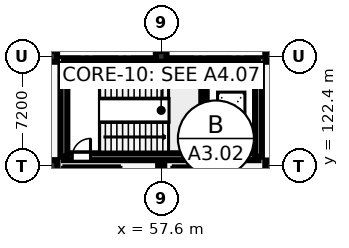
"""IFC4 building model, lengths in metres.
Left out: names, types, materials, properties, quantities, classifications, styles, units other than length and angle.
Written with IfcOpenShell. Run it as: python <this file> out.ifc"""

import sys

from ifc_helpers import new_model, si_unit, direction, frame, frame_2d, origin, origin_2d, place, context, subcontext, project, spatial, rectangle, hollow_rectangle, extrude, element, fill, save


model = new_model("IFC4")
c1 = context("Model", 3, precision=1e-05, world=origin(), true_north=direction((0.0, 1.0)))
c2 = subcontext(c1, "Body", "Model", "MODEL_VIEW")
j1 = project(units=[si_unit("LENGTHUNIT", "METRE"), si_unit("PLANEANGLEUNIT", "RADIAN")], contexts=[c1])
p1 = place(None, origin())
s1 = spatial("IfcSite", under=j1, at=p1, CompositionType="ELEMENT")
p2 = place(p1, origin())
s2 = spatial("IfcBuilding", under=s1, at=p2, CompositionType="ELEMENT")
p3 = place(p2, frame((0.0, 0.0, 9.6)))
s3 = spatial("IfcBuildingStorey", under=s2, at=p3, CompositionType="ELEMENT", Elevation=9.6)
p4 = place(p3, frame((50.4, 122.4, 0.0), z_axis=(0.0, 0.0, 1.0), x_axis=(1.0, 0.0, 0.0)))
e1 = element("IfcColumn", 1, at=p4, inside=s3, PredefinedType="COLUMN", context=c2, shape_type="SweptSolid", body=[
    extrude(rectangle(XDim=0.75, YDim=0.75, at=origin_2d()), origin(), (0.0, 0.0, 1.0), 4.2),
])
p5 = place(p3, frame((50.4, 129.6, 0.0), z_axis=(0.0, 0.0, 1.0), x_axis=(1.0, 0.0, 0.0)))
e2 = element("IfcColumn", 2, at=p5, inside=s3, PredefinedType="COLUMN", context=c2, shape_type="SweptSolid", body=[
    extrude(rectangle(XDim=0.7, YDim=0.7, at=origin_2d()), origin(), (0.0, 0.0, 1.0), 4.2),
])
p6 = place(p3, frame((57.6, 122.4, 0.0), z_axis=(0.0, 0.0, 1.0), x_axis=(1.0, 0.0, 0.0)))
e3 = element("IfcColumn", 3, at=p6, inside=s3, PredefinedType="COLUMN", context=c2, shape_type="SweptSolid", body=[
    extrude(hollow_rectangle(XDim=0.4, YDim=0.4, WallThickness=0.02, at=origin_2d()), origin(), (0.0, 0.0, 1.0), 4.2),
])
for number, where, z_axis, x_axis in (
    (4, (57.6, 129.6, 0.0), (0.0, 0.0, 1.0), (1.0, 0.0, 0.0)),
    (5, (64.8, 122.4, 0.0), (0.0, 0.0, 1.0), (1.0, 0.0, 0.0)),
    (6, (64.8, 129.6, 0.0), (0.0, 0.0, 1.0), (1.0, 0.0, 0.0)),
):
    element("IfcColumn", number, at=place(p3, frame(where, z_axis=z_axis, x_axis=x_axis)), inside=s3, PredefinedType="COLUMN", context=c2, shape_type="SweptSolid", body=[
        extrude(rectangle(XDim=0.7, YDim=0.7, at=origin_2d()), origin(), (0.0, 0.0, 1.0), 4.2),
    ])
p7 = place(p3, frame((51.2, 123.0, 0.0), z_axis=(0.0, 0.0, 1.0), x_axis=(1.0, 0.0, 0.0)))
e7 = element("IfcWall", 7, at=p7, inside=s3, PredefinedType="SHEAR", context=c2, shape_type="SweptSolid", body=[
    extrude(rectangle(XDim=12.8, YDim=0.45, at=frame_2d((6.4, 0.0))), origin(), (0.0, 0.0, 1.0), 3.88),
])
p8 = place(p7, frame((0.55, 0.0, 0.0)))
e8 = element("IfcOpeningElement", 8, at=p8, cuts=e7, PredefinedType="OPENING", context=c2, shape_type="SweptSolid", body=[
    extrude(rectangle(XDim=1.2, YDim=2.25, at=frame_2d((0.6, 1.125))), frame((0.0, 0.235, 0.0), z_axis=(0.0, -1.0, 0.0), x_axis=(1.0, 0.0, 0.0)), (0.0, 0.0, 1.0), 0.47),
])
p9 = place(p7, frame((10.458, 0.0, 0.0)))
e9 = element("IfcOpeningElement", 9, at=p9, cuts=e7, PredefinedType="OPENING", context=c2, shape_type="SweptSolid", body=[
    extrude(rectangle(XDim=1.1, YDim=2.2, at=frame_2d((0.55, 1.1))), frame((0.0, 0.235, 0.0), z_axis=(0.0, -1.0, 0.0), x_axis=(1.0, 0.0, 0.0)), (0.0, 0.0, 1.0), 0.47),
])
p10 = place(p3, frame((51.2, 129.1, 0.0), z_axis=(0.0, 0.0, 1.0), x_axis=(1.0, 0.0, 0.0)))
e10 = element("IfcWall", 10, at=p10, inside=s3, PredefinedType="SHEAR", context=c2, shape_type="SweptSolid", body=[
    extrude(rectangle(XDim=12.8, YDim=0.45, at=frame_2d((6.4, 0.0))), origin(), (0.0, 0.0, 1.0), 3.88),
])
for number, where, z_axis, x_axis in (
    (11, (51.2, 123.0, 0.0), (0.0, 0.0, 1.0), (0.0, 1.0, 0.0)),
    (12, (64.0, 123.0, 0.0), (0.0, 0.0, 1.0), (0.0, 1.0, 0.0)),
):
    element("IfcWall", number, at=place(p3, frame(where, z_axis=z_axis, x_axis=x_axis)), inside=s3, PredefinedType="SHEAR", context=c2, shape_type="SweptSolid", body=[
        extrude(rectangle(XDim=6.1, YDim=0.45, at=frame_2d((3.05, 0.0))), origin(), (0.0, 0.0, 1.0), 3.88),
    ])
p11 = place(p3, frame((60.416, 123.225, 0.0), z_axis=(0.0, 0.0, 1.0), x_axis=(0.0, 1.0, 0.0)))
e13 = element("IfcWall", 13, at=p11, inside=s3, PredefinedType="SHEAR", context=c2, shape_type="SweptSolid", body=[
    extrude(rectangle(XDim=5.65, YDim=0.35, at=frame_2d((2.825, 0.0))), origin(), (0.0, 0.0, 1.0), 3.88),
])
for number, where, z_axis, x_axis in (
    (14, (54.75, 122.2, 0.0), (0.0, 0.0, 1.0), (-1.0, 0.0, 0.0)),
    (15, (61.95, 122.2, 0.0), (0.0, 0.0, 1.0), (-1.0, 0.0, 0.0)),
):
    element("IfcWall", number, at=place(p3, frame(where, z_axis=z_axis, x_axis=x_axis)), inside=s3, PredefinedType="PARTITIONING", context=c2, shape_type="SweptSolid", body=[
        extrude(rectangle(XDim=3.45, YDim=0.2, at=frame_2d((1.725, 0.0))), origin(), (0.0, 0.0, 1.0), 2.94),
    ])
p12 = place(p8, origin())
e16 = element("IfcDoor", 16, at=p12, inside=s3, OperationType="SINGLE_SWING_RIGHT", PredefinedType="DOOR", context=c2, shape_type="SweptSolid", body=[
    extrude(rectangle(XDim=1.2, YDim=2.25, at=frame_2d((0.6, 1.125))), frame((0.0, 0.025, 0.0), z_axis=(0.0, -1.0, 0.0), x_axis=(1.0, 0.0, 0.0)), (0.0, 0.0, 1.0), 0.05),
])
fill(e8, e16)
p13 = place(p9, origin())
e17 = element("IfcDoor", 17, at=p13, inside=s3, OperationType="SLIDING_TO_LEFT", PredefinedType="DOOR", context=c2, shape_type="SweptSolid", body=[
    extrude(rectangle(XDim=1.1, YDim=2.2, at=frame_2d((0.55, 1.1))), frame((0.0, 0.025, 0.0), z_axis=(0.0, -1.0, 0.0), x_axis=(1.0, 0.0, 0.0)), (0.0, 0.0, 1.0), 0.05),
])
fill(e9, e17)
save(model, sys.argv[1])
